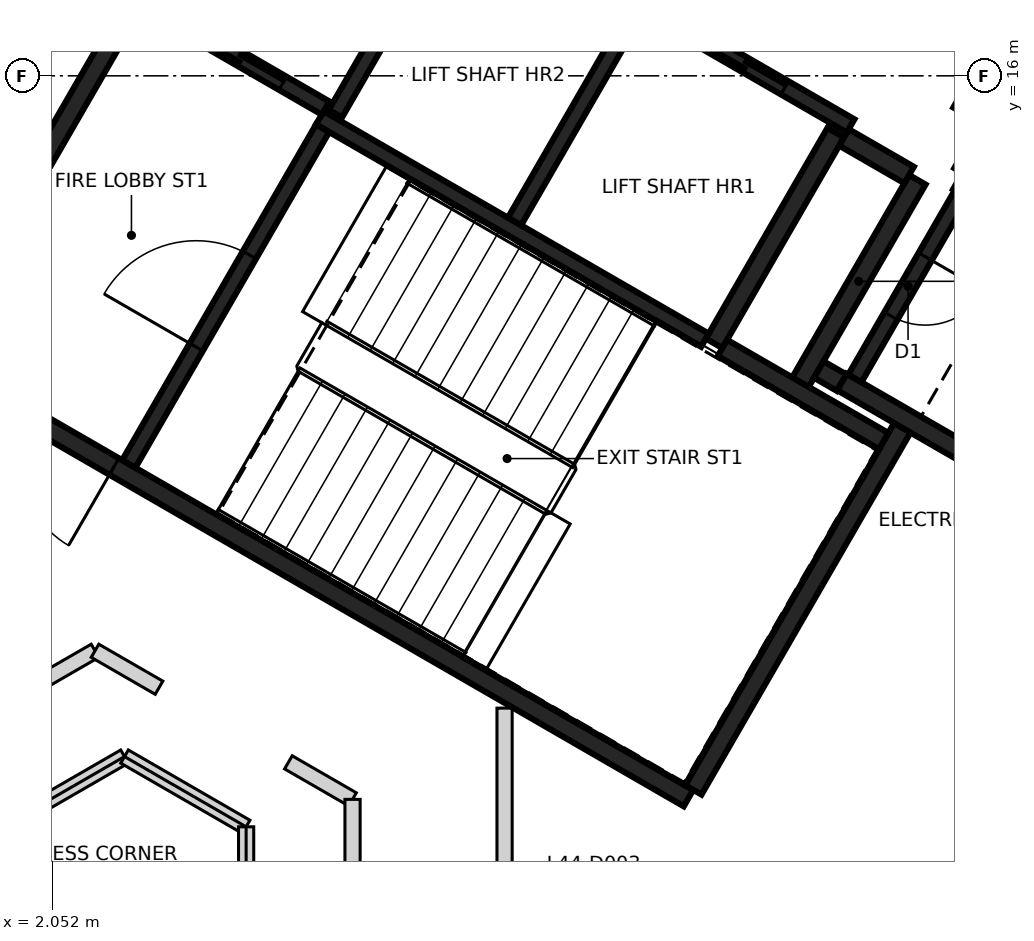
"""IFC4 building model, lengths in metres.
Left out: names, types, materials, properties, quantities, classifications, styles, units other than length and angle.
Written with IfcOpenShell. Run it as: python <this file> out.ifc"""

import sys

from ifc_helpers import new_model, si_unit, direction, frame, frame_2d, origin, place, context, subcontext, project, spatial, rectangle, extrude, element, fill, save


model = new_model("IFC4")
c1 = context("Model", 3, precision=1e-05, world=origin(), true_north=direction((0.0, 1.0)))
c2 = subcontext(c1, "Body", "Model", "MODEL_VIEW")
j1 = project(units=[si_unit("LENGTHUNIT", "METRE"), si_unit("PLANEANGLEUNIT", "RADIAN")], contexts=[c1])
p1 = place(None, origin())
s1 = spatial("IfcSite", under=j1, at=p1, CompositionType="ELEMENT")
p2 = place(p1, origin())
s2 = spatial("IfcBuilding", under=s1, at=p2, CompositionType="ELEMENT")
p3 = place(p2, frame((0.0, 0.0, 179.2)))
s3 = spatial("IfcBuildingStorey", under=s2, at=p3, CompositionType="ELEMENT", Elevation=179.2)
p4 = place(p3, frame((10.42, 6.498, 0.0), z_axis=(0.0, 0.0, 1.0), x_axis=(-0.866021906294, 0.500006057782, 0.0)))
e1 = element("IfcWall", 1, at=p4, inside=s3, PredefinedType="SHEAR", context=c2, shape_type="SweptSolid", body=[
    extrude(rectangle(XDim=11.55, YDim=0.25, at=frame_2d((5.775, 0.0))), origin(), (0.0, 0.0, 1.0), 3.25),
])
p5 = place(p4, frame((10.025, 0.0, 0.0)))
e2 = element("IfcOpeningElement", 2, at=p5, cuts=e1, PredefinedType="OPENING", context=c2, shape_type="SweptSolid", body=[
    extrude(rectangle(XDim=1.2, YDim=2.1, at=frame_2d((0.6, 1.05))), frame((0.0, 0.135, 0.0), z_axis=(0.0, -1.0, 0.0), x_axis=(1.0, 0.0, 0.0)), (0.0, 0.0, 1.0), 0.27),
])
p6 = place(p4, frame((8.725, 0.0, 0.0)))
e3 = element("IfcOpeningElement", 3, at=p6, cuts=e1, PredefinedType="OPENING", context=c2, shape_type="SweptSolid", body=[
    extrude(rectangle(XDim=1.2, YDim=2.1, at=frame_2d((0.6, 1.05))), frame((0.0, 0.135, 0.0), z_axis=(0.0, -1.0, 0.0), x_axis=(1.0, 0.0, 0.0)), (0.0, 0.0, 1.0), 0.27),
])
p7 = place(p3, frame((0.48, 12.381, 0.0), z_axis=(0.0, 0.0, 1.0), x_axis=(0.49999885962, 0.866026062182, 0.0)))
e4 = element("IfcWall", 4, at=p7, inside=s3, PredefinedType="SHEAR", context=c2, shape_type="SweptSolid", body=[
    extrude(rectangle(XDim=5.225, YDim=0.25, at=frame_2d((2.612, 0.0))), origin(), (0.0, 0.0, 1.0), 3.25),
])
p8 = place(p3, frame((13.238, 11.378, 0.0), z_axis=(0.0, 0.0, 1.0), x_axis=(-0.500008851346, -0.866020293397, 0.0)))
e5 = element("IfcWall", 5, at=p8, inside=s3, PredefinedType="SHEAR", context=c2, shape_type="SweptSolid", body=[
    extrude(rectangle(XDim=5.51, YDim=0.25, at=frame_2d((2.755, 0.0))), origin(), (0.0, 0.0, 1.0), 3.25),
])
p9 = place(p3, frame((12.357, 15.252, 0.0), z_axis=(0.0, 0.0, 1.0), x_axis=(-0.500028443584, -0.866008981251, 0.0)))
e6 = element("IfcWall", 6, at=p9, inside=s3, PredefinedType="SHEAR", context=c2, shape_type="SweptSolid", body=[
    extrude(rectangle(XDim=3.2, YDim=0.25, at=frame_2d((1.6, 0.0))), origin(), (0.0, 0.0, 1.0), 3.25),
])
p10 = place(p3, frame((14.918, 10.54, 0.0), z_axis=(0.0, 0.0, 1.0), x_axis=(-0.866063538972, 0.499933942099, 0.0)))
e7 = element("IfcWall", 7, at=p10, inside=s3, PredefinedType="SHEAR", context=c2, shape_type="SweptSolid", body=[
    extrude(rectangle(XDim=2.865, YDim=0.25, at=frame_2d((1.432, 0.0))), origin(), (0.0, 0.0, 1.0), 3.25),
])
p11 = place(p3, frame((13.963, 14.614, 0.0), z_axis=(0.0, 0.0, 1.0), x_axis=(0.866042235819, -0.499970844928, 0.0)))
e8 = element("IfcWall", 8, at=p11, inside=s3, PredefinedType="SHEAR", context=c2, shape_type="SweptSolid", body=[
    extrude(rectangle(XDim=2.865, YDim=0.25, at=frame_2d((1.432, 0.0))), origin(), (0.0, 0.0, 1.0), 3.25),
])
p12 = place(p3, frame((11.888, 11.961, 0.0), z_axis=(0.0, 0.0, 1.0), x_axis=(0.500003324108, 0.866023484601, 0.0)))
e9 = element("IfcWall", 9, at=p12, inside=s3, PredefinedType="SHEAR", context=c2, shape_type="SweptSolid", body=[
    extrude(rectangle(XDim=3.085, YDim=0.25, at=frame_2d((1.542, 0.0))), origin(), (0.0, 0.0, 1.0), 3.25),
])
p13 = place(p3, frame((10.865, 12.418, 0.0), z_axis=(0.0, 0.0, 1.0), x_axis=(0.866026229868, -0.499998569178, 0.0)))
e10 = element("IfcWall", 10, at=p13, inside=s3, PredefinedType="SHEAR", context=c2, shape_type="SweptSolid", body=[
    extrude(rectangle(XDim=2.449, YDim=0.25, at=frame_2d((1.225, 0.0))), origin(), (0.0, 0.0, 1.0), 3.25),
])
p14 = place(p3, frame((14.945, 17.135, 0.0), z_axis=(0.0, 0.0, 1.0), x_axis=(-0.499983108224, -0.866035156036, 0.0)))
e11 = element("IfcWall", 11, at=p14, inside=s3, PredefinedType="SHEAR", context=c2, shape_type="SweptSolid", body=[
    extrude(rectangle(XDim=1.865, YDim=0.25, at=frame_2d((0.932, 0.0))), origin(), (0.0, 0.0, 1.0), 3.25),
])
p15 = place(p3, frame((13.322, 14.695, 0.0), z_axis=(0.0, 0.0, 1.0), x_axis=(-0.866017078145, 0.500014420154, 0.0)))
e12 = element("IfcWall", 12, at=p15, inside=s3, PredefinedType="SHEAR", context=c2, shape_type="SweptSolid", body=[
    extrude(rectangle(XDim=0.989, YDim=0.25, at=frame_2d((0.495, 0.0))), origin(), (0.0, 0.0, 1.0), 3.25),
])
p16 = place(p3, frame((14.368, 15.315, 0.0), z_axis=(0.0, 0.0, 1.0), x_axis=(-0.499897359611, -0.866084655132, 0.0)))
e13 = element("IfcWall", 13, at=p16, inside=s3, PredefinedType="SHEAR", context=c2, shape_type="SweptSolid", body=[
    extrude(rectangle(XDim=0.685, YDim=0.25, at=frame_2d((0.342, 0.0))), origin(), (0.0, 0.0, 1.0), 3.25),
])
p17 = place(p3, frame((12.433, 11.964, 0.0), z_axis=(0.0, 0.0, 1.0), x_axis=(-0.866055875208, 0.499947218231, 0.0)))
e14 = element("IfcWall", 14, at=p17, inside=s3, PredefinedType="SHEAR", context=c2, shape_type="SweptSolid", body=[
    extrude(rectangle(XDim=0.345, YDim=0.25, at=frame_2d((0.172, 0.0))), origin(), (0.0, 0.0, 1.0), 3.25),
])
p18 = place(p3, frame((12.552, 15.342, 0.0), z_axis=(0.0, 0.0, 1.0), x_axis=(-0.866030299012, 0.499991521122, 0.0)))
e15 = element("IfcWall", 15, at=p18, inside=s3, PredefinedType="SHEAR", context=c2, shape_type="SweptSolid", body=[
    extrude(rectangle(XDim=6.1, YDim=0.2, at=frame_2d((3.05, 0.0))), origin(), (0.0, 0.0, 1.0), 3.25),
])
p19 = place(p18, frame((1.0, 0.0, 0.0)))
e16 = element("IfcOpeningElement", 16, at=p19, cuts=e15, PredefinedType="OPENING", context=c2, shape_type="SweptSolid", body=[
    extrude(rectangle(XDim=1.2, YDim=2.1, at=frame_2d((0.6, 1.05))), frame((0.0, 0.11, 0.0), z_axis=(0.0, -1.0, 0.0), x_axis=(1.0, 0.0, 0.0)), (0.0, 0.0, 1.0), 0.22),
])
p20 = place(p18, frame((3.982, 0.0, 0.0)))
e17 = element("IfcOpeningElement", 17, at=p20, cuts=e15, PredefinedType="OPENING", context=c2, shape_type="SweptSolid", body=[
    extrude(rectangle(XDim=1.2, YDim=2.1, at=frame_2d((0.6, 1.05))), frame((0.0, 0.11, 0.0), z_axis=(0.0, -1.0, 0.0), x_axis=(1.0, 0.0, 0.0)), (0.0, 0.0, 1.0), 0.22),
])
p21 = place(p3, frame((10.636, 12.521, 0.0), z_axis=(0.0, 0.0, 1.0), x_axis=(-0.866013252188, 0.500021046592, 0.0)))
e18 = element("IfcWall", 18, at=p21, inside=s3, PredefinedType="SHEAR", context=c2, shape_type="SweptSolid", body=[
    extrude(rectangle(XDim=5.851, YDim=0.2, at=frame_2d((2.925, 0.0))), origin(), (0.0, 0.0, 1.0), 3.25),
])
p22 = place(p3, frame((3.057, 10.895, 0.0), z_axis=(0.0, 0.0, 1.0), x_axis=(0.500027839223, 0.866009330205, 0.0)))
e19 = element("IfcWall", 19, at=p22, inside=s3, PredefinedType="SHEAR", context=c2, shape_type="SweptSolid", body=[
    extrude(rectangle(XDim=5.098, YDim=0.2, at=frame_2d((2.549, 0.0))), origin(), (0.0, 0.0, 1.0), 3.25),
])
p23 = place(p22, frame((1.774, 0.0, 0.0)))
e20 = element("IfcOpeningElement", 20, at=p23, cuts=e19, PredefinedType="OPENING", context=c2, shape_type="SweptSolid", body=[
    extrude(rectangle(XDim=1.4, YDim=2.1, at=frame_2d((0.7, 1.05))), frame((0.0, 0.11, 0.0), z_axis=(0.0, -1.0, 0.0), x_axis=(1.0, 0.0, 0.0)), (0.0, 0.0, 1.0), 0.22),
])
p24 = place(p3, frame((8.132, 14.084, 0.0), z_axis=(0.0, 0.0, 1.0), x_axis=(0.500030834389, 0.86600760081, 0.0)))
e21 = element("IfcWall", 21, at=p24, inside=s3, PredefinedType="SHEAR", context=c2, shape_type="SweptSolid", body=[
    extrude(rectangle(XDim=3.198, YDim=0.2, at=frame_2d((1.599, 0.0))), origin(), (0.0, 0.0, 1.0), 3.25),
])
p25 = place(p3, frame((14.008, 14.442, 0.0), z_axis=(0.0, 0.0, 1.0), x_axis=(-0.499986818241, -0.866033014143, 0.0)))
e22 = element("IfcWall", 22, at=p25, inside=s3, PredefinedType="SHEAR", context=c2, shape_type="SweptSolid", body=[
    extrude(rectangle(XDim=2.798, YDim=0.2, at=frame_2d((1.399, 0.0))), origin(), (0.0, 0.0, 1.0), 3.25),
])
p26 = place(p25, frame((0.949, 0.0, 0.0)))
e23 = element("IfcOpeningElement", 23, at=p26, cuts=e22, PredefinedType="OPENING", context=c2, shape_type="SweptSolid", body=[
    extrude(rectangle(XDim=0.9, YDim=2.1, at=frame_2d((0.45, 1.05))), frame((0.0, 0.11, 0.0), z_axis=(0.0, -1.0, 0.0), x_axis=(1.0, 0.0, 0.0)), (0.0, 0.0, 1.0), 0.22),
])
p27 = place(p3, frame((7.324, 18.187, 0.0), z_axis=(0.0, 0.0, 1.0), x_axis=(-0.499967891604, -0.866043940782, 0.0)))
e24 = element("IfcWall", 24, at=p27, inside=s3, PredefinedType="SHEAR", context=c2, shape_type="SweptSolid", body=[
    extrude(rectangle(XDim=3.1, YDim=0.2, at=frame_2d((1.55, 0.0))), origin(), (0.0, 0.0, 1.0), 3.25),
])
p28 = place(p3, frame((5.646, 15.576, 0.0), z_axis=(0.0, 0.0, 1.0), x_axis=(-0.866018407898, 0.500012117035, 0.0)))
e25 = element("IfcWall", 25, at=p28, inside=s3, PredefinedType="SHEAR", context=c2, shape_type="SweptSolid", body=[
    extrude(rectangle(XDim=2.651, YDim=0.2, at=frame_2d((1.325, 0.0))), origin(), (0.0, 0.0, 1.0), 3.25),
])
p29 = place(p28, frame((0.652, 0.0, 0.0)))
e26 = element("IfcOpeningElement", 26, at=p29, cuts=e25, PredefinedType="OPENING", context=c2, shape_type="SweptSolid", body=[
    extrude(rectangle(XDim=1.3, YDim=2.1, at=frame_2d((0.65, 1.05))), frame((0.0, 0.11, 0.0), z_axis=(0.0, -1.0, 0.0), x_axis=(1.0, 0.0, 0.0)), (0.0, 0.0, 1.0), 0.22),
])
p30 = place(p3, frame((-8.612, 1.956, 0.0), z_axis=(0.0, 0.0, 1.0), x_axis=(0.866034386606, 0.499984440973, 0.0)))
e27 = element("IfcWall", 27, at=p30, inside=s3, PredefinedType="PARTITIONING", context=c2, shape_type="SweptSolid", body=[
    extrude(rectangle(XDim=12.96, YDim=0.2, at=frame_2d((6.48, 0.0))), origin(), (0.0, 0.0, 1.0), 3.25),
])
p31 = place(p30, frame((8.105, 0.0, 0.0)))
e28 = element("IfcOpeningElement", 28, at=p31, cuts=e27, PredefinedType="OPENING", context=c2, shape_type="SweptSolid", body=[
    extrude(rectangle(XDim=0.9, YDim=2.1, at=frame_2d((0.45, 1.05))), frame((0.0, 0.11, 0.0), z_axis=(0.0, -1.0, 0.0), x_axis=(1.0, 0.0, 0.0)), (0.0, 0.0, 1.0), 0.22),
])
p32 = place(p30, frame((1.637, 0.0, 0.0)))
e29 = element("IfcOpeningElement", 29, at=p32, cuts=e27, PredefinedType="OPENING", context=c2, shape_type="SweptSolid", body=[
    extrude(rectangle(XDim=0.9, YDim=2.1, at=frame_2d((0.45, 1.05))), frame((0.0, 0.11, 0.0), z_axis=(0.0, -1.0, 0.0), x_axis=(1.0, 0.0, 0.0)), (0.0, 0.0, 1.0), 0.22),
])
p33 = place(p3, frame((-1.035, 12.742, 0.0), z_axis=(0.0, 0.0, 1.0), x_axis=(0.49267817774, 0.870211591039, 0.0)))
e30 = element("IfcWall", 30, at=p33, inside=s3, PredefinedType="PARTITIONING", context=c2, shape_type="SweptSolid", body=[
    extrude(rectangle(XDim=10.427, YDim=0.2, at=frame_2d((5.214, 0.0))), origin(), (0.0, 0.0, 1.0), 3.25),
])
p34 = place(p33, frame((5.568, 0.0, 0.0)))
e31 = element("IfcOpeningElement", 31, at=p34, cuts=e30, PredefinedType="OPENING", context=c2, shape_type="SweptSolid", body=[
    extrude(rectangle(XDim=1.0, YDim=2.1, at=frame_2d((0.5, 1.05))), frame((0.0, 0.11, 0.0), z_axis=(0.0, -1.0, 0.0), x_axis=(1.0, 0.0, 0.0)), (0.0, 0.0, 1.0), 0.22),
])
p35 = place(p3, frame((2.612, 8.436, 0.0), z_axis=(0.0, 0.0, 1.0), x_axis=(0.866055964107, -0.499947064232, 0.0)))
e32 = element("IfcWall", 32, at=p35, inside=s3, PredefinedType="PARTITIONING", context=c2, shape_type="SweptSolid", body=[
    extrude(rectangle(XDim=0.972, YDim=0.2, at=frame_2d((0.486, 0.0))), origin(), (0.0, 0.0, 1.0), 3.25),
])
p36 = place(p3, frame((5.156, 6.968, 0.0), z_axis=(0.0, 0.0, 1.0), x_axis=(0.866123013327, -0.49983089719, 0.0)))
e33 = element("IfcWall", 33, at=p36, inside=s3, PredefinedType="PARTITIONING", context=c2, shape_type="SweptSolid", body=[
    extrude(rectangle(XDim=0.974, YDim=0.2, at=frame_2d((0.487, 0.0))), origin(), (0.0, 0.0, 1.0), 3.25),
])
p37 = place(p3, frame((6.0, -6.481, 0.0), z_axis=(0.0, 0.0, 1.0), x_axis=(0.0, 1.0, 0.0)))
e34 = element("IfcWall", 34, at=p37, inside=s3, PredefinedType="PARTITIONING", context=c2, shape_type="SweptSolid", body=[
    extrude(rectangle(XDim=12.962, YDim=0.2, at=frame_2d((6.481, 0.0))), origin(), (0.0, 0.0, 1.0), 3.25),
])
p38 = place(p37, frame((3.956, 0.0, 0.0)))
e35 = element("IfcOpeningElement", 35, at=p38, cuts=e34, PredefinedType="OPENING", context=c2, shape_type="SweptSolid", body=[
    extrude(rectangle(XDim=0.9, YDim=2.1, at=frame_2d((0.45, 1.05))), frame((0.0, 0.11, 0.0), z_axis=(0.0, -1.0, 0.0), x_axis=(1.0, 0.0, 0.0)), (0.0, 0.0, 1.0), 0.22),
])
p39 = place(p37, frame((10.425, 0.0, 0.0)))
e36 = element("IfcOpeningElement", 36, at=p39, cuts=e34, PredefinedType="OPENING", context=c2, shape_type="SweptSolid", body=[
    extrude(rectangle(XDim=0.9, YDim=2.1, at=frame_2d((0.45, 1.05))), frame((0.0, 0.11, 0.0), z_axis=(0.0, -1.0, 0.0), x_axis=(1.0, 0.0, 0.0)), (0.0, 0.0, 1.0), 0.22),
])
p40 = place(p3, frame((8.0, -5.058, 0.0), z_axis=(0.0, 0.0, 1.0), x_axis=(0.0, 1.0, 0.0)))
e37 = element("IfcWall", 37, at=p40, inside=s3, PredefinedType="PARTITIONING", context=c2, shape_type="SweptSolid", body=[
    extrude(rectangle(XDim=12.74, YDim=0.2, at=frame_2d((6.37, 0.0))), origin(), (0.0, 0.0, 1.0), 3.25),
])
p41 = place(p40, frame((9.508, 0.0, 0.0)))
e38 = element("IfcOpeningElement", 38, at=p41, cuts=e37, PredefinedType="OPENING", context=c2, shape_type="SweptSolid", body=[
    extrude(rectangle(XDim=0.95, YDim=2.1, at=frame_2d((0.475, 1.05))), frame((0.0, 0.11, 0.0), z_axis=(0.0, -1.0, 0.0), x_axis=(1.0, 0.0, 0.0)), (0.0, 0.0, 1.0), 0.22),
])
p42 = place(p3, frame((-7.6, 0.924, 0.0), z_axis=(0.0, 0.0, 1.0), x_axis=(0.866028806638, 0.499994106039, 0.0)))
e39 = element("IfcWall", 39, at=p42, inside=s3, PredefinedType="PARTITIONING", context=c2, shape_type="SweptSolid", body=[
    extrude(rectangle(XDim=12.24, YDim=0.2, at=frame_2d((6.12, 0.0))), origin(), (0.0, 0.0, 1.0), 3.25),
])
p43 = place(p3, frame((3.0, 7.044, 0.0), z_axis=(0.0, 0.0, 1.0), x_axis=(0.865875248522, -0.500259986404, 0.0)))
e40 = element("IfcWall", 40, at=p43, inside=s3, PredefinedType="PARTITIONING", context=c2, shape_type="SweptSolid", body=[
    extrude(rectangle(XDim=1.848, YDim=0.2, at=frame_2d((0.924, 0.0))), origin(), (0.0, 0.0, 1.0), 3.25),
])
p44 = place(p3, frame((4.6, -6.12, 0.0), z_axis=(0.0, 0.0, 1.0), x_axis=(0.0, 1.0, 0.0)))
e41 = element("IfcWall", 41, at=p44, inside=s3, PredefinedType="PARTITIONING", context=c2, shape_type="SweptSolid", body=[
    extrude(rectangle(XDim=12.24, YDim=0.2, at=frame_2d((6.12, 0.0))), origin(), (0.0, 0.0, 1.0), 3.25),
])
p45 = place(p29, origin())
e42 = element("IfcDoor", 42, at=p45, inside=s3, OperationType="SLIDING_TO_LEFT", PredefinedType="DOOR", context=c2, shape_type="SweptSolid", body=[
    extrude(rectangle(XDim=1.3, YDim=2.1, at=frame_2d((0.65, 1.05))), frame((0.0, 0.025, 0.0), z_axis=(0.0, -1.0, 0.0), x_axis=(1.0, 0.0, 0.0)), (0.0, 0.0, 1.0), 0.05),
])
fill(e26, e42)
p46 = place(p19, origin())
e43 = element("IfcDoor", 43, at=p46, inside=s3, OperationType="DOUBLE_DOOR_SLIDING", PredefinedType="DOOR", context=c2, shape_type="SweptSolid", body=[
    extrude(rectangle(XDim=1.2, YDim=2.1, at=frame_2d((0.6, 1.05))), frame((0.0, 0.025, 0.0), z_axis=(0.0, -1.0, 0.0), x_axis=(1.0, 0.0, 0.0)), (0.0, 0.0, 1.0), 0.05),
])
fill(e16, e43)
p47 = place(p6, origin())
e44 = element("IfcDoor", 44, at=p47, inside=s3, OperationType="SINGLE_SWING_RIGHT", PredefinedType="DOOR", context=c2, shape_type="SweptSolid", body=[
    extrude(rectangle(XDim=1.2, YDim=2.1, at=frame_2d((0.6, 1.05))), frame((0.0, 0.025, 0.0), z_axis=(0.0, -1.0, 0.0), x_axis=(1.0, 0.0, 0.0)), (0.0, 0.0, 1.0), 0.05),
])
fill(e3, e44)
p48 = place(p23, origin())
e45 = element("IfcDoor", 45, at=p48, inside=s3, OperationType="SINGLE_SWING_LEFT", PredefinedType="DOOR", context=c2, shape_type="SweptSolid", body=[
    extrude(rectangle(XDim=1.4, YDim=2.1, at=frame_2d((0.7, 1.05))), frame((0.0, 0.025, 0.0), z_axis=(0.0, -1.0, 0.0), x_axis=(1.0, 0.0, 0.0)), (0.0, 0.0, 1.0), 0.05),
])
fill(e20, e45)
p49 = place(p26, origin())
e46 = element("IfcDoor", 46, at=p49, inside=s3, OperationType="SINGLE_SWING_LEFT", PredefinedType="DOOR", context=c2, shape_type="SweptSolid", body=[
    extrude(rectangle(XDim=0.9, YDim=2.1, at=frame_2d((0.45, 1.05))), frame((0.0, 0.025, 0.0), z_axis=(0.0, -1.0, 0.0), x_axis=(1.0, 0.0, 0.0)), (0.0, 0.0, 1.0), 0.05),
])
fill(e23, e46)
save(model, sys.argv[1])
